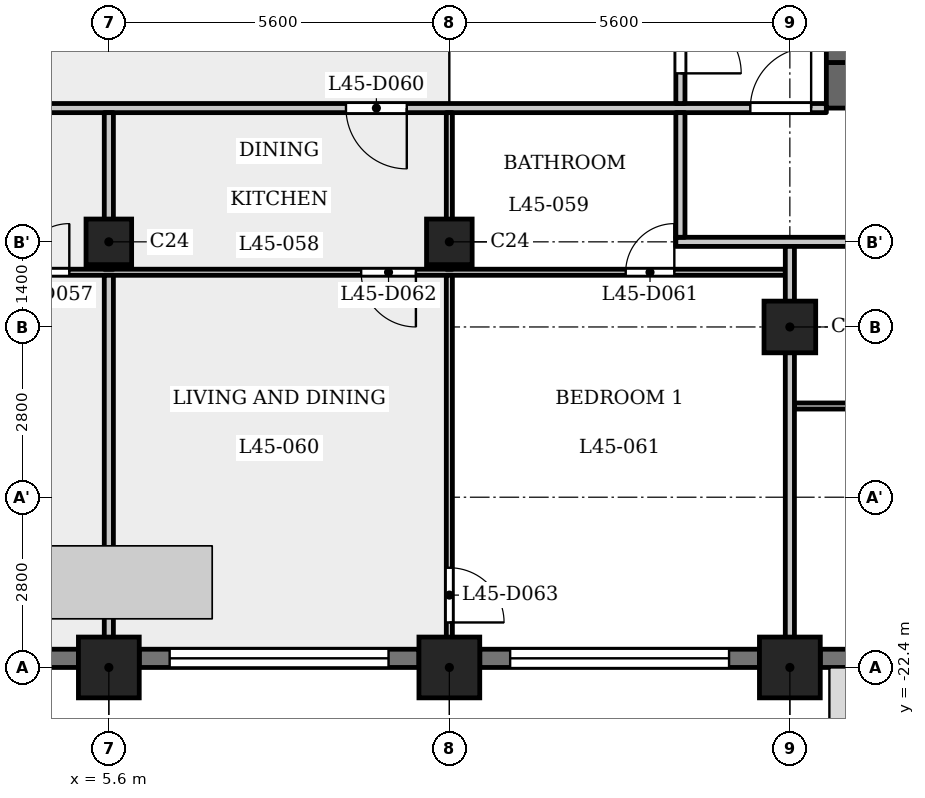
"""IFC4 building model, lengths in metres.
Left out: names, types, materials, properties, quantities, classifications, styles, units other than length and angle.
Written with IfcOpenShell. Run it as: python <this file> out.ifc"""

import sys

from ifc_helpers import new_model, si_unit, direction, frame, frame_2d, origin, origin_2d, place, context, subcontext, project, spatial, rectangle, extrude, element, fill, save


model = new_model("IFC4")
c1 = context("Model", 3, precision=1e-05, world=origin(), true_north=direction((0.0, 1.0)))
c2 = subcontext(c1, "Body", "Model", "MODEL_VIEW")
j1 = project(units=[si_unit("LENGTHUNIT", "METRE"), si_unit("PLANEANGLEUNIT", "RADIAN")], contexts=[c1])
p1 = place(None, origin())
s1 = spatial("IfcSite", under=j1, at=p1, CompositionType="ELEMENT")
p2 = place(p1, origin())
s2 = spatial("IfcBuilding", under=s1, at=p2, CompositionType="ELEMENT")
p3 = place(p2, frame((0.0, 0.0, 174.6)))
s3 = spatial("IfcBuildingStorey", under=s2, at=p3, CompositionType="ELEMENT", Elevation=174.6)
for number, where, z_axis, x_axis in (
    (1, (5.6, -22.4, 0.0), (0.0, 0.0, 1.0), (1.0, 0.0, 0.0)),
    (2, (11.2, -22.4, 0.0), (0.0, 0.0, 1.0), (1.0, 0.0, 0.0)),
    (3, (16.8, -22.4, 0.0), (0.0, 0.0, 1.0), (1.0, 0.0, 0.0)),
):
    element("IfcColumn", number, at=place(p3, frame(where, z_axis=z_axis, x_axis=x_axis)), inside=s3, PredefinedType="COLUMN", context=c2, shape_type="SweptSolid", body=[
        extrude(rectangle(XDim=1.0, YDim=1.0, at=origin_2d()), origin(), (0.0, 0.0, 1.0), 3.5),
    ])
p4 = place(p3, frame((16.8, -16.8, 0.0), z_axis=(0.0, 0.0, 1.0), x_axis=(1.0, 0.0, 0.0)))
e4 = element("IfcColumn", 4, at=p4, inside=s3, PredefinedType="COLUMN", context=c2, shape_type="SweptSolid", body=[
    extrude(rectangle(XDim=0.85, YDim=0.85, at=origin_2d()), origin(), (0.0, 0.0, 1.0), 3.5),
])
for number, where, z_axis, x_axis in (
    (5, (5.6, -15.4, 0.0), (0.0, 0.0, 1.0), (1.0, 0.0, 0.0)),
    (6, (11.2, -15.4, 0.0), (0.0, 0.0, 1.0), (1.0, 0.0, 0.0)),
):
    element("IfcColumn", number, at=place(p3, frame(where, z_axis=z_axis, x_axis=x_axis)), inside=s3, PredefinedType="COLUMN", context=c2, shape_type="SweptSolid", body=[
        extrude(rectangle(XDim=0.75, YDim=0.75, at=origin_2d()), origin(), (0.0, 0.0, 1.0), 3.5),
    ])
p5 = place(p3, frame((0.5, -22.25, 0.0), z_axis=(0.0, 0.0, 1.0), x_axis=(1.0, 0.0, 0.0)))
e7 = element("IfcWall", 7, at=p5, inside=s3, PredefinedType="SOLIDWALL", context=c2, shape_type="SweptSolid", body=[
    extrude(rectangle(XDim=4.6, YDim=0.3, at=frame_2d((2.3, 0.0))), origin(), (0.0, 0.0, 1.0), 2.4),
])
p6 = place(p5, frame((0.5, 0.0, 1.2)))
e8 = element("IfcOpeningElement", 8, at=p6, cuts=e7, PredefinedType="OPENING", context=c2, shape_type="SweptSolid", body=[
    extrude(rectangle(XDim=3.6, YDim=0.95, at=frame_2d((1.8, 0.475))), frame((0.0, 0.16, 0.0), z_axis=(0.0, -1.0, 0.0), x_axis=(1.0, 0.0, 0.0)), (0.0, 0.0, 1.0), 0.32),
])
p7 = place(p3, frame((6.1, -22.25, 0.0), z_axis=(0.0, 0.0, 1.0), x_axis=(1.0, 0.0, 0.0)))
e9 = element("IfcWall", 9, at=p7, inside=s3, PredefinedType="SOLIDWALL", context=c2, shape_type="SweptSolid", body=[
    extrude(rectangle(XDim=4.6, YDim=0.3, at=frame_2d((2.3, 0.0))), origin(), (0.0, 0.0, 1.0), 2.4),
])
p8 = place(p7, frame((0.5, 0.0, 1.2)))
e10 = element("IfcOpeningElement", 10, at=p8, cuts=e9, PredefinedType="OPENING", context=c2, shape_type="SweptSolid", body=[
    extrude(rectangle(XDim=3.6, YDim=0.95, at=frame_2d((1.8, 0.475))), frame((0.0, 0.16, 0.0), z_axis=(0.0, -1.0, 0.0), x_axis=(1.0, 0.0, 0.0)), (0.0, 0.0, 1.0), 0.32),
])
p9 = place(p3, frame((11.7, -22.25, 0.0), z_axis=(0.0, 0.0, 1.0), x_axis=(1.0, 0.0, 0.0)))
e11 = element("IfcWall", 11, at=p9, inside=s3, PredefinedType="SOLIDWALL", context=c2, shape_type="SweptSolid", body=[
    extrude(rectangle(XDim=4.6, YDim=0.3, at=frame_2d((2.3, 0.0))), origin(), (0.0, 0.0, 1.0), 2.4),
])
p10 = place(p9, frame((0.5, 0.0, 1.2)))
e12 = element("IfcOpeningElement", 12, at=p10, cuts=e11, PredefinedType="OPENING", context=c2, shape_type="SweptSolid", body=[
    extrude(rectangle(XDim=3.6, YDim=0.95, at=frame_2d((1.8, 0.475))), frame((0.0, 0.16, 0.0), z_axis=(0.0, -1.0, 0.0), x_axis=(1.0, 0.0, 0.0)), (0.0, 0.0, 1.0), 0.32),
])
p11 = place(p3, frame((17.3, -22.25, 0.0), z_axis=(0.0, 0.0, 1.0), x_axis=(1.0, 0.0, 0.0)))
e13 = element("IfcWall", 13, at=p11, inside=s3, PredefinedType="SOLIDWALL", context=c2, shape_type="SweptSolid", body=[
    extrude(rectangle(XDim=2.7, YDim=0.3, at=frame_2d((1.35, 0.0))), origin(), (0.0, 0.0, 1.0), 2.4),
])
p12 = place(p11, frame((0.45, 0.0, 0.9)))
e14 = element("IfcOpeningElement", 14, at=p12, cuts=e13, PredefinedType="OPENING", context=c2, shape_type="SweptSolid", body=[
    extrude(rectangle(XDim=1.8, YDim=1.25, at=frame_2d((0.9, 0.625))), frame((0.0, 0.16, 0.0), z_axis=(0.0, -1.0, 0.0), x_axis=(1.0, 0.0, 0.0)), (0.0, 0.0, 1.0), 0.32),
])
p13 = place(p3, frame((17.4, -12.825, 0.0), z_axis=(0.0, 0.0, 1.0), x_axis=(1.0, 0.0, 0.0)))
e15 = element("IfcWall", 15, at=p13, inside=s3, PredefinedType="SHEAR", context=c2, shape_type="SweptSolid", body=[
    extrude(rectangle(XDim=10.4, YDim=0.75, at=frame_2d((5.2, 0.0))), origin(), (0.0, 0.0, 1.0), 3.15),
])
p14 = place(p3, frame((17.6, -12.45, 0.0), z_axis=(0.0, 0.0, 1.0), x_axis=(0.0, 1.0, 0.0)))
e16 = element("IfcWall", 16, at=p14, inside=s3, PredefinedType="SHEAR", context=c2, shape_type="SweptSolid", body=[
    extrude(rectangle(XDim=24.9, YDim=0.4, at=frame_2d((12.45, 0.0))), origin(), (0.0, 0.0, 1.0), 3.15),
])
p15 = place(p14, frame((8.65, 0.0, 0.0)))
e17 = element("IfcOpeningElement", 17, at=p15, cuts=e16, PredefinedType="OPENING", context=c2, shape_type="SweptSolid", body=[
    extrude(rectangle(XDim=0.9, YDim=2.1, at=frame_2d((0.45, 1.05))), frame((0.0, 0.21, 0.0), z_axis=(0.0, -1.0, 0.0), x_axis=(1.0, 0.0, 0.0)), (0.0, 0.0, 1.0), 0.42),
])
p16 = place(p14, frame((15.6, 0.0, 0.0)))
e18 = element("IfcOpeningElement", 18, at=p16, cuts=e16, PredefinedType="OPENING", context=c2, shape_type="SweptSolid", body=[
    extrude(rectangle(XDim=1.1, YDim=2.1, at=frame_2d((0.55, 1.05))), frame((0.0, 0.21, 0.0), z_axis=(0.0, -1.0, 0.0), x_axis=(1.0, 0.0, 0.0)), (0.0, 0.0, 1.0), 0.42),
])
p17 = place(p14, frame((18.0, 0.0, 0.0)))
e19 = element("IfcOpeningElement", 19, at=p17, cuts=e16, PredefinedType="OPENING", context=c2, shape_type="SweptSolid", body=[
    extrude(rectangle(XDim=1.1, YDim=2.1, at=frame_2d((0.55, 1.05))), frame((0.0, 0.21, 0.0), z_axis=(0.0, -1.0, 0.0), x_axis=(1.0, 0.0, 0.0)), (0.0, 0.0, 1.0), 0.42),
])
p18 = place(p14, frame((23.025, 0.0, 0.0)))
e20 = element("IfcOpeningElement", 20, at=p18, cuts=e16, PredefinedType="OPENING", context=c2, shape_type="SweptSolid", body=[
    extrude(rectangle(XDim=1.1, YDim=2.1, at=frame_2d((0.55, 1.05))), frame((0.0, 0.21, 0.0), z_axis=(0.0, -1.0, 0.0), x_axis=(1.0, 0.0, 0.0)), (0.0, 0.0, 1.0), 0.42),
])
p19 = place(p14, frame((0.775, 0.0, 0.0)))
e21 = element("IfcOpeningElement", 21, at=p19, cuts=e16, PredefinedType="OPENING", context=c2, shape_type="SweptSolid", body=[
    extrude(rectangle(XDim=1.1, YDim=2.1, at=frame_2d((0.55, 1.05))), frame((0.0, 0.21, 0.0), z_axis=(0.0, -1.0, 0.0), x_axis=(1.0, 0.0, 0.0)), (0.0, 0.0, 1.0), 0.42),
])
p20 = place(p14, frame((12.925, 0.0, 0.0)))
e22 = element("IfcOpeningElement", 22, at=p20, cuts=e16, PredefinedType="OPENING", context=c2, shape_type="SweptSolid", body=[
    extrude(rectangle(XDim=1.8, YDim=2.1, at=frame_2d((0.9, 1.05))), frame((0.0, 0.21, 0.0), z_axis=(0.0, -1.0, 0.0), x_axis=(1.0, 0.0, 0.0)), (0.0, 0.0, 1.0), 0.42),
])
p21 = place(p3, frame((16.875, -18.1, 0.0), z_axis=(0.0, 0.0, 1.0), x_axis=(1.0, 0.0, 0.0)))
e23 = element("IfcWall", 23, at=p21, inside=s3, PredefinedType="PARTITIONING", context=c2, shape_type="SweptSolid", body=[
    extrude(rectangle(XDim=9.565, YDim=0.1, at=frame_2d((4.782, 0.0))), origin(), (0.0, 0.0, 1.0), 3.15),
])
p22 = place(p21, frame((7.639, 0.0, 0.0)))
e24 = element("IfcOpeningElement", 24, at=p22, cuts=e23, PredefinedType="OPENING", context=c2, shape_type="SweptSolid", body=[
    extrude(rectangle(XDim=0.8, YDim=2.1, at=frame_2d((0.4, 1.05))), frame((0.0, 0.06, 0.0), z_axis=(0.0, -1.0, 0.0), x_axis=(1.0, 0.0, 0.0)), (0.0, 0.0, 1.0), 0.12),
])
p23 = place(p21, frame((4.075, 0.0, 0.0)))
e25 = element("IfcOpeningElement", 25, at=p23, cuts=e23, PredefinedType="OPENING", context=c2, shape_type="SweptSolid", body=[
    extrude(rectangle(XDim=0.9, YDim=2.1, at=frame_2d((0.45, 1.05))), frame((0.0, 0.06, 0.0), z_axis=(0.0, -1.0, 0.0), x_axis=(1.0, 0.0, 0.0)), (0.0, 0.0, 1.0), 0.12),
])
p24 = place(p3, frame((-16.725, -15.9, 0.0), z_axis=(0.0, 0.0, 1.0), x_axis=(1.0, 0.0, 0.0)))
e26 = element("IfcWall", 26, at=p24, inside=s3, PredefinedType="PARTITIONING", context=c2, shape_type="SweptSolid", body=[
    extrude(rectangle(XDim=33.45, YDim=0.1, at=frame_2d((16.725, 0.0))), origin(), (0.0, 0.0, 1.0), 3.15),
])
p25 = place(p24, frame((9.675, 0.0, 0.0)))
e27 = element("IfcOpeningElement", 27, at=p25, cuts=e26, PredefinedType="OPENING", context=c2, shape_type="SweptSolid", body=[
    extrude(rectangle(XDim=0.8, YDim=2.1, at=frame_2d((0.4, 1.05))), frame((0.0, 0.06, 0.0), z_axis=(0.0, -1.0, 0.0), x_axis=(1.0, 0.0, 0.0)), (0.0, 0.0, 1.0), 0.12),
])
p26 = place(p24, frame((4.075, 0.0, 0.0)))
e28 = element("IfcOpeningElement", 28, at=p26, cuts=e26, PredefinedType="OPENING", context=c2, shape_type="SweptSolid", body=[
    extrude(rectangle(XDim=0.9, YDim=2.1, at=frame_2d((0.45, 1.05))), frame((0.0, 0.06, 0.0), z_axis=(0.0, -1.0, 0.0), x_axis=(1.0, 0.0, 0.0)), (0.0, 0.0, 1.0), 0.12),
])
p27 = place(p24, frame((20.875, 0.0, 0.0)))
e29 = element("IfcOpeningElement", 29, at=p27, cuts=e26, PredefinedType="OPENING", context=c2, shape_type="SweptSolid", body=[
    extrude(rectangle(XDim=0.8, YDim=2.1, at=frame_2d((0.4, 1.05))), frame((0.0, 0.06, 0.0), z_axis=(0.0, -1.0, 0.0), x_axis=(1.0, 0.0, 0.0)), (0.0, 0.0, 1.0), 0.12),
])
p28 = place(p24, frame((15.275, 0.0, 0.0)))
e30 = element("IfcOpeningElement", 30, at=p28, cuts=e26, PredefinedType="OPENING", context=c2, shape_type="SweptSolid", body=[
    extrude(rectangle(XDim=0.9, YDim=2.1, at=frame_2d((0.45, 1.05))), frame((0.0, 0.06, 0.0), z_axis=(0.0, -1.0, 0.0), x_axis=(1.0, 0.0, 0.0)), (0.0, 0.0, 1.0), 0.12),
])
p29 = place(p24, frame((30.825, 0.0, 0.0)))
e31 = element("IfcOpeningElement", 31, at=p29, cuts=e26, PredefinedType="OPENING", context=c2, shape_type="SweptSolid", body=[
    extrude(rectangle(XDim=0.8, YDim=2.1, at=frame_2d((0.4, 1.05))), frame((0.0, 0.06, 0.0), z_axis=(0.0, -1.0, 0.0), x_axis=(1.0, 0.0, 0.0)), (0.0, 0.0, 1.0), 0.12),
])
p30 = place(p24, frame((26.475, 0.0, 0.0)))
e32 = element("IfcOpeningElement", 32, at=p30, cuts=e26, PredefinedType="OPENING", context=c2, shape_type="SweptSolid", body=[
    extrude(rectangle(XDim=0.9, YDim=2.1, at=frame_2d((0.45, 1.05))), frame((0.0, 0.06, 0.0), z_axis=(0.0, -1.0, 0.0), x_axis=(1.0, 0.0, 0.0)), (0.0, 0.0, 1.0), 0.12),
])
p31 = place(p3, frame((14.925, -15.4, 0.0), z_axis=(0.0, 0.0, 1.0), x_axis=(1.0, 0.0, 0.0)))
e33 = element("IfcWall", 33, at=p31, inside=s3, PredefinedType="PARTITIONING", context=c2, shape_type="SweptSolid", body=[
    extrude(rectangle(XDim=12.559, YDim=0.15, at=frame_2d((6.279, 0.0))), origin(), (0.0, 0.0, 1.0), 3.15),
])
p32 = place(p31, frame((5.775, 0.0, 0.0)))
e34 = element("IfcOpeningElement", 34, at=p32, cuts=e33, PredefinedType="OPENING", context=c2, shape_type="SweptSolid", body=[
    extrude(rectangle(XDim=1.0, YDim=2.1, at=frame_2d((0.5, 1.05))), frame((0.0, 0.085, 0.0), z_axis=(0.0, -1.0, 0.0), x_axis=(1.0, 0.0, 0.0)), (0.0, 0.0, 1.0), 0.17),
])
p33 = place(p3, frame((-17.4, -13.2, 0.0), z_axis=(0.0, 0.0, 1.0), x_axis=(1.0, 0.0, 0.0)))
e35 = element("IfcWall", 35, at=p33, inside=s3, PredefinedType="PARTITIONING", context=c2, shape_type="SweptSolid", body=[
    extrude(rectangle(XDim=34.8, YDim=0.15, at=frame_2d((17.4, 0.0))), origin(), (0.0, 0.0, 1.0), 3.15),
])
p34 = place(p33, frame((0.15, 0.0, 0.0)))
e36 = element("IfcOpeningElement", 36, at=p34, cuts=e35, PredefinedType="OPENING", context=c2, shape_type="SweptSolid", body=[
    extrude(rectangle(XDim=1.0, YDim=2.1, at=frame_2d((0.5, 1.05))), frame((0.0, 0.085, 0.0), z_axis=(0.0, -1.0, 0.0), x_axis=(1.0, 0.0, 0.0)), (0.0, 0.0, 1.0), 0.17),
])
p35 = place(p33, frame((33.55, 0.0, 0.0)))
e37 = element("IfcOpeningElement", 37, at=p35, cuts=e35, PredefinedType="OPENING", context=c2, shape_type="SweptSolid", body=[
    extrude(rectangle(XDim=1.0, YDim=2.1, at=frame_2d((0.5, 1.05))), frame((0.0, 0.085, 0.0), z_axis=(0.0, -1.0, 0.0), x_axis=(1.0, 0.0, 0.0)), (0.0, 0.0, 1.0), 0.17),
])
p36 = place(p33, frame((15.7, 0.0, 0.0)))
e38 = element("IfcOpeningElement", 38, at=p36, cuts=e35, PredefinedType="OPENING", context=c2, shape_type="SweptSolid", body=[
    extrude(rectangle(XDim=1.0, YDim=2.1, at=frame_2d((0.5, 1.05))), frame((0.0, 0.085, 0.0), z_axis=(0.0, -1.0, 0.0), x_axis=(1.0, 0.0, 0.0)), (0.0, 0.0, 1.0), 0.17),
])
p37 = place(p33, frame((26.9, 0.0, 0.0)))
e39 = element("IfcOpeningElement", 39, at=p37, cuts=e35, PredefinedType="OPENING", context=c2, shape_type="SweptSolid", body=[
    extrude(rectangle(XDim=1.0, YDim=2.1, at=frame_2d((0.5, 1.05))), frame((0.0, 0.085, 0.0), z_axis=(0.0, -1.0, 0.0), x_axis=(1.0, 0.0, 0.0)), (0.0, 0.0, 1.0), 0.17),
])
p38 = place(p3, frame((5.6, -22.88, 0.0), z_axis=(0.0, 0.0, 1.0), x_axis=(0.0, 1.0, 0.0)))
e40 = element("IfcWall", 40, at=p38, inside=s3, PredefinedType="PARTITIONING", context=c2, shape_type="SweptSolid", body=[
    extrude(rectangle(XDim=6.93, YDim=0.15, at=frame_2d((3.465, 0.0))), origin(), (0.0, 0.0, 1.0), 3.15),
])
p39 = place(p3, frame((5.6, -15.85, 0.0), z_axis=(0.0, 0.0, 1.0), x_axis=(0.0, 1.0, 0.0)))
e41 = element("IfcWall", 41, at=p39, inside=s3, PredefinedType="PARTITIONING", context=c2, shape_type="SweptSolid", body=[
    extrude(rectangle(XDim=2.575, YDim=0.15, at=frame_2d((1.288, 0.0))), origin(), (0.0, 0.0, 1.0), 3.15),
])
p40 = place(p3, frame((11.2, -22.88, 0.0), z_axis=(0.0, 0.0, 1.0), x_axis=(0.0, 1.0, 0.0)))
e42 = element("IfcWall", 42, at=p40, inside=s3, PredefinedType="PARTITIONING", context=c2, shape_type="SweptSolid", body=[
    extrude(rectangle(XDim=6.93, YDim=0.1, at=frame_2d((3.465, 0.0))), origin(), (0.0, 0.0, 1.0), 3.15),
])
p41 = place(p40, frame((1.22, 0.0, 0.0)))
e43 = element("IfcOpeningElement", 43, at=p41, cuts=e42, PredefinedType="OPENING", context=c2, shape_type="SweptSolid", body=[
    extrude(rectangle(XDim=0.9, YDim=2.1, at=frame_2d((0.45, 1.05))), frame((0.0, 0.06, 0.0), z_axis=(0.0, -1.0, 0.0), x_axis=(1.0, 0.0, 0.0)), (0.0, 0.0, 1.0), 0.12),
])
p42 = place(p3, frame((11.2, -15.85, 0.0), z_axis=(0.0, 0.0, 1.0), x_axis=(0.0, 1.0, 0.0)))
e44 = element("IfcWall", 44, at=p42, inside=s3, PredefinedType="PARTITIONING", context=c2, shape_type="SweptSolid", body=[
    extrude(rectangle(XDim=2.575, YDim=0.1, at=frame_2d((1.288, 0.0))), origin(), (0.0, 0.0, 1.0), 3.15),
])
p43 = place(p3, frame((15.0, -15.325, 0.0), z_axis=(0.0, 0.0, 1.0), x_axis=(0.0, 1.0, 0.0)))
e45 = element("IfcWall", 45, at=p43, inside=s3, PredefinedType="PARTITIONING", context=c2, shape_type="SweptSolid", body=[
    extrude(rectangle(XDim=2.05, YDim=0.15, at=frame_2d((1.025, 0.0))), origin(), (0.0, 0.0, 1.0), 3.15),
])
p44 = place(p3, frame((15.0, -13.125, 0.0), z_axis=(0.0, 0.0, 1.0), x_axis=(0.0, 1.0, 0.0)))
e46 = element("IfcWall", 46, at=p44, inside=s3, PredefinedType="PARTITIONING", context=c2, shape_type="SweptSolid", body=[
    extrude(rectangle(XDim=6.356, YDim=0.15, at=frame_2d((3.178, 0.0))), origin(), (0.0, 0.0, 1.0), 3.15),
])
p45 = place(p44, frame((0.496, 0.0, 0.0)))
e47 = element("IfcOpeningElement", 47, at=p45, cuts=e46, PredefinedType="OPENING", context=c2, shape_type="SweptSolid", body=[
    extrude(rectangle(XDim=1.0, YDim=2.1, at=frame_2d((0.5, 1.05))), frame((0.0, 0.085, 0.0), z_axis=(0.0, -1.0, 0.0), x_axis=(1.0, 0.0, 0.0)), (0.0, 0.0, 1.0), 0.17),
])
p46 = place(p3, frame((16.8, -22.88, 0.0), z_axis=(0.0, 0.0, 1.0), x_axis=(0.0, 1.0, 0.0)))
e48 = element("IfcWall", 48, at=p46, inside=s3, PredefinedType="PARTITIONING", context=c2, shape_type="SweptSolid", body=[
    extrude(rectangle(XDim=7.405, YDim=0.15, at=frame_2d((3.702, 0.0))), origin(), (0.0, 0.0, 1.0), 3.15),
])
p47 = place(p45, origin())
e49 = element("IfcDoor", 49, at=p47, inside=s3, OperationType="SINGLE_SWING_LEFT", PredefinedType="DOOR", context=c2, shape_type="SweptSolid", body=[
    extrude(rectangle(XDim=1.0, YDim=2.1, at=frame_2d((0.5, 1.05))), frame((0.0, 0.025, 0.0), z_axis=(0.0, -1.0, 0.0), x_axis=(1.0, 0.0, 0.0)), (0.0, 0.0, 1.0), 0.05),
])
fill(e47, e49)
p48 = place(p35, origin())
e50 = element("IfcDoor", 50, at=p48, inside=s3, OperationType="SINGLE_SWING_LEFT", PredefinedType="DOOR", context=c2, shape_type="SweptSolid", body=[
    extrude(rectangle(XDim=1.0, YDim=2.1, at=frame_2d((0.5, 1.05))), frame((0.0, 0.025, 0.0), z_axis=(0.0, -1.0, 0.0), x_axis=(1.0, 0.0, 0.0)), (0.0, 0.0, 1.0), 0.05),
])
fill(e37, e50)
p49 = place(p27, origin())
e51 = element("IfcDoor", 51, at=p49, inside=s3, OperationType="SINGLE_SWING_LEFT", PredefinedType="DOOR", context=c2, shape_type="SweptSolid", body=[
    extrude(rectangle(XDim=0.8, YDim=2.1, at=frame_2d((0.4, 1.05))), frame((0.0, 0.025, 0.0), z_axis=(0.0, -1.0, 0.0), x_axis=(1.0, 0.0, 0.0)), (0.0, 0.0, 1.0), 0.05),
])
fill(e29, e51)
p50 = place(p37, origin())
e52 = element("IfcDoor", 52, at=p50, inside=s3, OperationType="SINGLE_SWING_RIGHT", PredefinedType="DOOR", context=c2, shape_type="SweptSolid", body=[
    extrude(rectangle(XDim=1.0, YDim=2.1, at=frame_2d((0.5, 1.05))), frame((0.0, 0.025, 0.0), z_axis=(0.0, -1.0, 0.0), x_axis=(1.0, 0.0, 0.0)), (0.0, 0.0, 1.0), 0.05),
])
fill(e39, e52)
p51 = place(p29, origin())
e53 = element("IfcDoor", 53, at=p51, inside=s3, OperationType="SINGLE_SWING_LEFT", PredefinedType="DOOR", context=c2, shape_type="SweptSolid", body=[
    extrude(rectangle(XDim=0.8, YDim=2.1, at=frame_2d((0.4, 1.05))), frame((0.0, 0.025, 0.0), z_axis=(0.0, -1.0, 0.0), x_axis=(1.0, 0.0, 0.0)), (0.0, 0.0, 1.0), 0.05),
])
fill(e31, e53)
p52 = place(p30, origin())
e54 = element("IfcDoor", 54, at=p52, inside=s3, OperationType="SINGLE_SWING_RIGHT", PredefinedType="DOOR", context=c2, shape_type="SweptSolid", body=[
    extrude(rectangle(XDim=0.9, YDim=2.1, at=frame_2d((0.45, 1.05))), frame((0.0, 0.025, 0.0), z_axis=(0.0, -1.0, 0.0), x_axis=(1.0, 0.0, 0.0)), (0.0, 0.0, 1.0), 0.05),
])
fill(e32, e54)
p53 = place(p41, origin())
e55 = element("IfcDoor", 55, at=p53, inside=s3, OperationType="SINGLE_SWING_LEFT", PredefinedType="DOOR", context=c2, shape_type="SweptSolid", body=[
    extrude(rectangle(XDim=0.9, YDim=2.1, at=frame_2d((0.45, 1.05))), frame((0.0, 0.025, 0.0), z_axis=(0.0, -1.0, 0.0), x_axis=(1.0, 0.0, 0.0)), (0.0, 0.0, 1.0), 0.05),
])
fill(e43, e55)
p54 = place(p8, origin())
e56 = element("IfcWindow", 56, at=p54, inside=s3, PartitioningType="SINGLE_PANEL", PredefinedType="WINDOW", context=c2, shape_type="SweptSolid", body=[
    extrude(rectangle(XDim=3.6, YDim=0.95, at=frame_2d((1.8, 0.475))), frame((0.0, 0.03, 0.0), z_axis=(0.0, -1.0, 0.0), x_axis=(1.0, 0.0, 0.0)), (0.0, 0.0, 1.0), 0.06),
])
fill(e10, e56)
p55 = place(p10, origin())
e57 = element("IfcWindow", 57, at=p55, inside=s3, PartitioningType="SINGLE_PANEL", PredefinedType="WINDOW", context=c2, shape_type="SweptSolid", body=[
    extrude(rectangle(XDim=3.6, YDim=0.95, at=frame_2d((1.8, 0.475))), frame((0.0, 0.03, 0.0), z_axis=(0.0, -1.0, 0.0), x_axis=(1.0, 0.0, 0.0)), (0.0, 0.0, 1.0), 0.06),
])
fill(e12, e57)
save(model, sys.argv[1])
